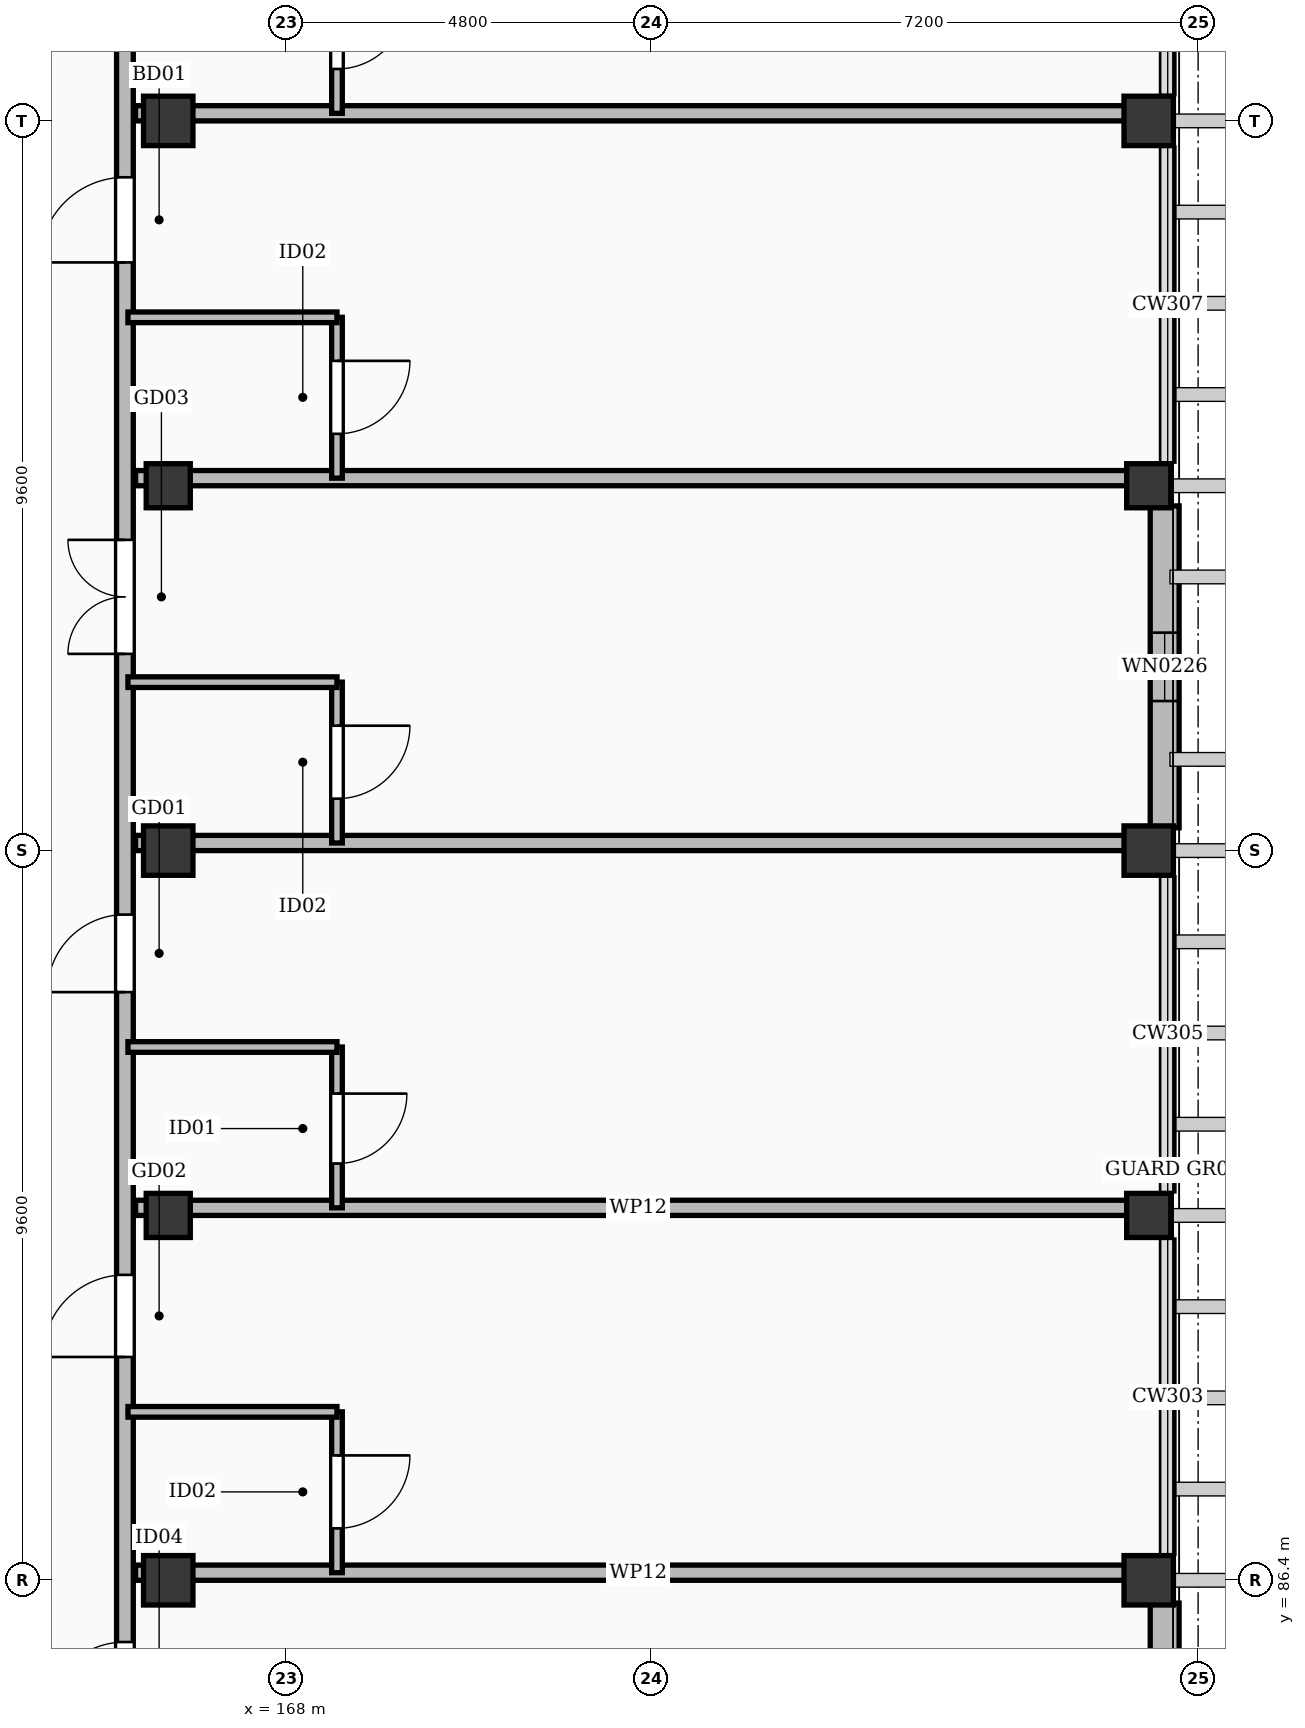
"""IFC4 building model, lengths in metres.
Left out: names, types, materials, properties, quantities, classifications, styles, units other than length and angle.
Written with IfcOpenShell. Run it as: python <this file> out.ifc"""

import sys

from ifc_helpers import new_model, si_unit, direction, frame, frame_2d, origin, origin_2d, place, context, subcontext, project, spatial, rectangle, extrude, element, fill, save


model = new_model("IFC4")
c1 = context("Model", 3, precision=1e-05, world=origin(), true_north=direction((0.0, 1.0)))
c2 = subcontext(c1, "Body", "Model", "MODEL_VIEW")
j1 = project(units=[si_unit("LENGTHUNIT", "METRE"), si_unit("PLANEANGLEUNIT", "RADIAN")], contexts=[c1])
p1 = place(None, origin())
s1 = spatial("IfcSite", under=j1, at=p1, CompositionType="ELEMENT")
p2 = place(p1, origin())
s2 = spatial("IfcBuilding", under=s1, at=p2, CompositionType="ELEMENT")
p3 = place(p2, frame((0.0, 0.0, 39.0)))
s3 = spatial("IfcBuildingStorey", under=s2, at=p3, CompositionType="ELEMENT", Elevation=39.0)
for number, where, z_axis, x_axis in (
    (1, (166.45, 86.4, 0.0), (0.0, 0.0, 1.0), (1.0, 0.0, 0.0)),
    (2, (166.45, 96.0, 0.0), (0.0, 0.0, 1.0), (1.0, 0.0, 0.0)),
    (3, (166.45, 105.6, 0.0), (0.0, 0.0, 1.0), (1.0, 0.0, 0.0)),
    (4, (179.35, 86.4, 0.0), (0.0, 0.0, 1.0), (1.0, 0.0, 0.0)),
    (5, (179.35, 96.0, 0.0), (0.0, 0.0, 1.0), (1.0, 0.0, 0.0)),
    (6, (179.35, 105.6, 0.0), (0.0, 0.0, 1.0), (1.0, 0.0, 0.0)),
):
    element("IfcColumn", number, at=place(p3, frame(where, z_axis=z_axis, x_axis=x_axis)), inside=s3, PredefinedType="COLUMN", context=c2, shape_type="SweptSolid", body=[
        extrude(rectangle(XDim=0.65, YDim=0.65, at=origin_2d()), origin(), (0.0, 0.0, 1.0), 3.6),
    ])
for number, where, z_axis, x_axis in (
    (7, (166.45, 91.2, 0.0), (0.0, 0.0, 1.0), (1.0, 0.0, 0.0)),
    (8, (166.45, 100.8, 0.0), (0.0, 0.0, 1.0), (1.0, 0.0, 0.0)),
    (9, (179.35, 91.2, 0.0), (0.0, 0.0, 1.0), (1.0, 0.0, 0.0)),
    (10, (179.35, 100.8, 0.0), (0.0, 0.0, 1.0), (1.0, 0.0, 0.0)),
):
    element("IfcColumn", number, at=place(p3, frame(where, z_axis=z_axis, x_axis=x_axis)), inside=s3, PredefinedType="COLUMN", context=c2, shape_type="SweptSolid", body=[
        extrude(rectangle(XDim=0.58, YDim=0.58, at=origin_2d()), origin(), (0.0, 0.0, 1.0), 3.6),
    ])
p4 = place(p3, frame((179.56, 86.1, 0.0), z_axis=(0.0, 0.0, 1.0), x_axis=(0.0, -1.0, 0.0)))
e11 = element("IfcWall", 11, at=p4, inside=s3, PredefinedType="SOLIDWALL", context=c2, shape_type="SweptSolid", body=[
    extrude(rectangle(XDim=4.235, YDim=0.38, at=frame_2d((2.118, 0.0))), origin(), (0.0, 0.0, 1.0), 2.602),
])
p5 = place(p4, frame((0.992, 0.0, 0.55)))
e12 = element("IfcOpeningElement", 12, at=p5, cuts=e11, PredefinedType="OPENING", context=c2, shape_type="SweptSolid", body=[
    extrude(rectangle(XDim=2.25, YDim=1.79, at=frame_2d((1.125, 0.895))), frame((0.0, 0.202, 0.0), z_axis=(0.0, -1.0, 0.0), x_axis=(1.0, 0.0, 0.0)), (0.0, 0.0, 1.0), 0.404),
])
p6 = place(p3, frame((179.56, 100.535, 0.0), z_axis=(0.0, 0.0, 1.0), x_axis=(0.0, -1.0, 0.0)))
e13 = element("IfcWall", 13, at=p6, inside=s3, PredefinedType="SOLIDWALL", context=c2, shape_type="SweptSolid", body=[
    extrude(rectangle(XDim=4.235, YDim=0.38, at=frame_2d((2.117, 0.0))), origin(), (0.0, 0.0, 1.0), 2.602),
])
p7 = place(p6, frame((1.667, 0.0, 0.55)))
e14 = element("IfcOpeningElement", 14, at=p7, cuts=e13, PredefinedType="OPENING", context=c2, shape_type="SweptSolid", body=[
    extrude(rectangle(XDim=0.9, YDim=1.68, at=frame_2d((0.45, 0.84))), frame((0.0, 0.202, 0.0), z_axis=(0.0, -1.0, 0.0), x_axis=(1.0, 0.0, 0.0)), (0.0, 0.0, 1.0), 0.404),
])
p8 = place(p3, frame((165.88, 57.95, 0.0), z_axis=(0.0, 0.0, 1.0), x_axis=(0.0, 1.0, 0.0)))
e15 = element("IfcWall", 15, at=p8, inside=s3, PredefinedType="PARTITIONING", context=c2, shape_type="SweptSolid", body=[
    extrude(rectangle(XDim=67.7, YDim=0.22, at=frame_2d((33.85, 0.0))), origin(), (0.0, 0.0, 1.0), 2.602),
])
p9 = place(p8, frame((5.15, 0.0, 0.0)))
e16 = element("IfcOpeningElement", 16, at=p9, cuts=e15, PredefinedType="OPENING", context=c2, shape_type="SweptSolid", body=[
    extrude(rectangle(XDim=0.98, YDim=2.15, at=frame_2d((0.49, 1.075))), frame((0.0, 0.122, 0.0), z_axis=(0.0, -1.0, 0.0), x_axis=(1.0, 0.0, 0.0)), (0.0, 0.0, 1.0), 0.244),
])
p10 = place(p8, frame((11.838, 0.0, 0.0)))
e17 = element("IfcOpeningElement", 17, at=p10, cuts=e15, PredefinedType="OPENING", context=c2, shape_type="SweptSolid", body=[
    extrude(rectangle(XDim=1.5, YDim=2.3, at=frame_2d((0.75, 1.15))), frame((0.0, 0.122, 0.0), z_axis=(0.0, -1.0, 0.0), x_axis=(1.0, 0.0, 0.0)), (0.0, 0.0, 1.0), 0.244),
])
p11 = place(p8, frame((16.988, 0.0, 0.0)))
e18 = element("IfcOpeningElement", 18, at=p11, cuts=e15, PredefinedType="OPENING", context=c2, shape_type="SweptSolid", body=[
    extrude(rectangle(XDim=1.12, YDim=2.15, at=frame_2d((0.56, 1.075))), frame((0.0, 0.122, 0.0), z_axis=(0.0, -1.0, 0.0), x_axis=(1.0, 0.0, 0.0)), (0.0, 0.0, 1.0), 0.244),
])
p12 = place(p8, frame((21.788, 0.0, 0.0)))
e19 = element("IfcOpeningElement", 19, at=p12, cuts=e15, PredefinedType="OPENING", context=c2, shape_type="SweptSolid", body=[
    extrude(rectangle(XDim=1.28, YDim=2.16, at=frame_2d((0.64, 1.08))), frame((0.0, 0.122, 0.0), z_axis=(0.0, -1.0, 0.0), x_axis=(1.0, 0.0, 0.0)), (0.0, 0.0, 1.0), 0.244),
])
p13 = place(p8, frame((26.588, 0.0, 0.0)))
e20 = element("IfcOpeningElement", 20, at=p13, cuts=e15, PredefinedType="OPENING", context=c2, shape_type="SweptSolid", body=[
    extrude(rectangle(XDim=1.05, YDim=2.18, at=frame_2d((0.525, 1.09))), frame((0.0, 0.122, 0.0), z_axis=(0.0, -1.0, 0.0), x_axis=(1.0, 0.0, 0.0)), (0.0, 0.0, 1.0), 0.244),
])
p14 = place(p8, frame((31.388, 0.0, 0.0)))
e21 = element("IfcOpeningElement", 21, at=p14, cuts=e15, PredefinedType="OPENING", context=c2, shape_type="SweptSolid", body=[
    extrude(rectangle(XDim=1.08, YDim=2.25, at=frame_2d((0.54, 1.125))), frame((0.0, 0.122, 0.0), z_axis=(0.0, -1.0, 0.0), x_axis=(1.0, 0.0, 0.0)), (0.0, 0.0, 1.0), 0.244),
])
p15 = place(p8, frame((36.188, 0.0, 0.0)))
e22 = element("IfcOpeningElement", 22, at=p15, cuts=e15, PredefinedType="OPENING", context=c2, shape_type="SweptSolid", body=[
    extrude(rectangle(XDim=1.02, YDim=2.2, at=frame_2d((0.51, 1.1))), frame((0.0, 0.122, 0.0), z_axis=(0.0, -1.0, 0.0), x_axis=(1.0, 0.0, 0.0)), (0.0, 0.0, 1.0), 0.244),
])
p16 = place(p8, frame((40.638, 0.0, 0.0)))
e23 = element("IfcOpeningElement", 23, at=p16, cuts=e15, PredefinedType="OPENING", context=c2, shape_type="SweptSolid", body=[
    extrude(rectangle(XDim=1.5, YDim=2.3, at=frame_2d((0.75, 1.15))), frame((0.0, 0.122, 0.0), z_axis=(0.0, -1.0, 0.0), x_axis=(1.0, 0.0, 0.0)), (0.0, 0.0, 1.0), 0.244),
])
p17 = place(p8, frame((45.788, 0.0, 0.0)))
e24 = element("IfcOpeningElement", 24, at=p17, cuts=e15, PredefinedType="OPENING", context=c2, shape_type="SweptSolid", body=[
    extrude(rectangle(XDim=1.12, YDim=2.15, at=frame_2d((0.56, 1.075))), frame((0.0, 0.122, 0.0), z_axis=(0.0, -1.0, 0.0), x_axis=(1.0, 0.0, 0.0)), (0.0, 0.0, 1.0), 0.244),
])
p18 = place(p8, frame((50.588, 0.0, 0.0)))
e25 = element("IfcOpeningElement", 25, at=p18, cuts=e15, PredefinedType="OPENING", context=c2, shape_type="SweptSolid", body=[
    extrude(rectangle(XDim=1.28, YDim=2.16, at=frame_2d((0.64, 1.08))), frame((0.0, 0.122, 0.0), z_axis=(0.0, -1.0, 0.0), x_axis=(1.0, 0.0, 0.0)), (0.0, 0.0, 1.0), 0.244),
])
p19 = place(p8, frame((55.388, 0.0, 0.0)))
e26 = element("IfcOpeningElement", 26, at=p19, cuts=e15, PredefinedType="OPENING", context=c2, shape_type="SweptSolid", body=[
    extrude(rectangle(XDim=1.05, YDim=2.18, at=frame_2d((0.525, 1.09))), frame((0.0, 0.122, 0.0), z_axis=(0.0, -1.0, 0.0), x_axis=(1.0, 0.0, 0.0)), (0.0, 0.0, 1.0), 0.244),
])
p20 = place(p8, frame((60.188, 0.0, 0.0)))
e27 = element("IfcOpeningElement", 27, at=p20, cuts=e15, PredefinedType="OPENING", context=c2, shape_type="SweptSolid", body=[
    extrude(rectangle(XDim=1.08, YDim=2.25, at=frame_2d((0.54, 1.125))), frame((0.0, 0.122, 0.0), z_axis=(0.0, -1.0, 0.0), x_axis=(1.0, 0.0, 0.0)), (0.0, 0.0, 1.0), 0.244),
])
p21 = place(p8, frame((64.988, 0.0, 0.0)))
e28 = element("IfcOpeningElement", 28, at=p21, cuts=e15, PredefinedType="OPENING", context=c2, shape_type="SweptSolid", body=[
    extrude(rectangle(XDim=1.02, YDim=2.2, at=frame_2d((0.51, 1.1))), frame((0.0, 0.122, 0.0), z_axis=(0.0, -1.0, 0.0), x_axis=(1.0, 0.0, 0.0)), (0.0, 0.0, 1.0), 0.244),
])
p22 = place(p3, frame((166.02, 86.5, 0.0), z_axis=(0.0, 0.0, 1.0), x_axis=(1.0, 0.0, 0.0)))
e29 = element("IfcWall", 29, at=p22, inside=s3, PredefinedType="PARTITIONING", context=c2, shape_type="SweptSolid", body=[
    extrude(rectangle(XDim=13.23, YDim=0.2, at=frame_2d((6.615, 0.0))), origin(), (0.0, 0.0, 1.0), 2.602),
])
p23 = place(p3, frame((168.67, 86.5, 0.0), z_axis=(0.0, 0.0, 1.0), x_axis=(0.0, 1.0, 0.0)))
e30 = element("IfcWall", 30, at=p23, inside=s3, PredefinedType="PARTITIONING", context=c2, shape_type="SweptSolid", body=[
    extrude(rectangle(XDim=2.116, YDim=0.14, at=frame_2d((1.058, 0.0))), origin(), (0.0, 0.0, 1.0), 2.772),
])
p24 = place(p23, frame((0.583, 0.0, 0.0)))
e31 = element("IfcOpeningElement", 31, at=p24, cuts=e30, PredefinedType="OPENING", context=c2, shape_type="SweptSolid", body=[
    extrude(rectangle(XDim=0.96, YDim=2.12, at=frame_2d((0.48, 1.06))), frame((0.0, 0.082, 0.0), z_axis=(0.0, -1.0, 0.0), x_axis=(1.0, 0.0, 0.0)), (0.0, 0.0, 1.0), 0.164),
])
p25 = place(p3, frame((165.92, 88.616, 0.0), z_axis=(0.0, 0.0, 1.0), x_axis=(1.0, 0.0, 0.0)))
e32 = element("IfcWall", 32, at=p25, inside=s3, PredefinedType="PARTITIONING", context=c2, shape_type="SweptSolid", body=[
    extrude(rectangle(XDim=2.75, YDim=0.14, at=frame_2d((1.375, 0.0))), origin(), (0.0, 0.0, 1.0), 2.772),
])
p26 = place(p3, frame((166.02, 91.3, 0.0), z_axis=(0.0, 0.0, 1.0), x_axis=(1.0, 0.0, 0.0)))
e33 = element("IfcWall", 33, at=p26, inside=s3, PredefinedType="PARTITIONING", context=c2, shape_type="SweptSolid", body=[
    extrude(rectangle(XDim=13.23, YDim=0.2, at=frame_2d((6.615, 0.0))), origin(), (0.0, 0.0, 1.0), 2.602),
])
p27 = place(p3, frame((168.67, 91.3, 0.0), z_axis=(0.0, 0.0, 1.0), x_axis=(0.0, 1.0, 0.0)))
e34 = element("IfcWall", 34, at=p27, inside=s3, PredefinedType="PARTITIONING", context=c2, shape_type="SweptSolid", body=[
    extrude(rectangle(XDim=2.116, YDim=0.14, at=frame_2d((1.058, 0.0))), origin(), (0.0, 0.0, 1.0), 2.772),
])
p28 = place(p27, frame((0.583, 0.0, 0.0)))
e35 = element("IfcOpeningElement", 35, at=p28, cuts=e34, PredefinedType="OPENING", context=c2, shape_type="SweptSolid", body=[
    extrude(rectangle(XDim=0.92, YDim=2.1, at=frame_2d((0.46, 1.05))), frame((0.0, 0.082, 0.0), z_axis=(0.0, -1.0, 0.0), x_axis=(1.0, 0.0, 0.0)), (0.0, 0.0, 1.0), 0.164),
])
p29 = place(p3, frame((165.92, 93.416, 0.0), z_axis=(0.0, 0.0, 1.0), x_axis=(1.0, 0.0, 0.0)))
e36 = element("IfcWall", 36, at=p29, inside=s3, PredefinedType="PARTITIONING", context=c2, shape_type="SweptSolid", body=[
    extrude(rectangle(XDim=2.75, YDim=0.14, at=frame_2d((1.375, 0.0))), origin(), (0.0, 0.0, 1.0), 2.772),
])
p30 = place(p3, frame((166.02, 96.1, 0.0), z_axis=(0.0, 0.0, 1.0), x_axis=(1.0, 0.0, 0.0)))
e37 = element("IfcWall", 37, at=p30, inside=s3, PredefinedType="PARTITIONING", context=c2, shape_type="SweptSolid", body=[
    extrude(rectangle(XDim=13.23, YDim=0.2, at=frame_2d((6.615, 0.0))), origin(), (0.0, 0.0, 1.0), 2.602),
])
p31 = place(p3, frame((168.67, 96.1, 0.0), z_axis=(0.0, 0.0, 1.0), x_axis=(0.0, 1.0, 0.0)))
e38 = element("IfcWall", 38, at=p31, inside=s3, PredefinedType="PARTITIONING", context=c2, shape_type="SweptSolid", body=[
    extrude(rectangle(XDim=2.116, YDim=0.14, at=frame_2d((1.058, 0.0))), origin(), (0.0, 0.0, 1.0), 2.772),
])
p32 = place(p31, frame((0.583, 0.0, 0.0)))
e39 = element("IfcOpeningElement", 39, at=p32, cuts=e38, PredefinedType="OPENING", context=c2, shape_type="SweptSolid", body=[
    extrude(rectangle(XDim=0.96, YDim=2.12, at=frame_2d((0.48, 1.06))), frame((0.0, 0.082, 0.0), z_axis=(0.0, -1.0, 0.0), x_axis=(1.0, 0.0, 0.0)), (0.0, 0.0, 1.0), 0.164),
])
p33 = place(p3, frame((165.92, 98.216, 0.0), z_axis=(0.0, 0.0, 1.0), x_axis=(1.0, 0.0, 0.0)))
e40 = element("IfcWall", 40, at=p33, inside=s3, PredefinedType="PARTITIONING", context=c2, shape_type="SweptSolid", body=[
    extrude(rectangle(XDim=2.75, YDim=0.14, at=frame_2d((1.375, 0.0))), origin(), (0.0, 0.0, 1.0), 2.772),
])
p34 = place(p3, frame((166.02, 100.9, 0.0), z_axis=(0.0, 0.0, 1.0), x_axis=(1.0, 0.0, 0.0)))
e41 = element("IfcWall", 41, at=p34, inside=s3, PredefinedType="PARTITIONING", context=c2, shape_type="SweptSolid", body=[
    extrude(rectangle(XDim=13.23, YDim=0.2, at=frame_2d((6.615, 0.0))), origin(), (0.0, 0.0, 1.0), 2.602),
])
p35 = place(p3, frame((168.67, 100.9, 0.0), z_axis=(0.0, 0.0, 1.0), x_axis=(0.0, 1.0, 0.0)))
e42 = element("IfcWall", 42, at=p35, inside=s3, PredefinedType="PARTITIONING", context=c2, shape_type="SweptSolid", body=[
    extrude(rectangle(XDim=2.116, YDim=0.14, at=frame_2d((1.058, 0.0))), origin(), (0.0, 0.0, 1.0), 2.772),
])
p36 = place(p35, frame((0.583, 0.0, 0.0)))
e43 = element("IfcOpeningElement", 43, at=p36, cuts=e42, PredefinedType="OPENING", context=c2, shape_type="SweptSolid", body=[
    extrude(rectangle(XDim=0.96, YDim=2.12, at=frame_2d((0.48, 1.06))), frame((0.0, 0.082, 0.0), z_axis=(0.0, -1.0, 0.0), x_axis=(1.0, 0.0, 0.0)), (0.0, 0.0, 1.0), 0.164),
])
p37 = place(p3, frame((165.92, 103.016, 0.0), z_axis=(0.0, 0.0, 1.0), x_axis=(1.0, 0.0, 0.0)))
e44 = element("IfcWall", 44, at=p37, inside=s3, PredefinedType="PARTITIONING", context=c2, shape_type="SweptSolid", body=[
    extrude(rectangle(XDim=2.75, YDim=0.14, at=frame_2d((1.375, 0.0))), origin(), (0.0, 0.0, 1.0), 2.772),
])
p38 = place(p3, frame((166.02, 105.7, 0.0), z_axis=(0.0, 0.0, 1.0), x_axis=(1.0, 0.0, 0.0)))
e45 = element("IfcWall", 45, at=p38, inside=s3, PredefinedType="PARTITIONING", context=c2, shape_type="SweptSolid", body=[
    extrude(rectangle(XDim=13.23, YDim=0.2, at=frame_2d((6.615, 0.0))), origin(), (0.0, 0.0, 1.0), 2.602),
])
p39 = place(p3, frame((168.67, 105.7, 0.0), z_axis=(0.0, 0.0, 1.0), x_axis=(0.0, 1.0, 0.0)))
e46 = element("IfcWall", 46, at=p39, inside=s3, PredefinedType="PARTITIONING", context=c2, shape_type="SweptSolid", body=[
    extrude(rectangle(XDim=2.116, YDim=0.14, at=frame_2d((1.058, 0.0))), origin(), (0.0, 0.0, 1.0), 2.772),
])
p40 = place(p39, frame((0.583, 0.0, 0.0)))
e47 = element("IfcOpeningElement", 47, at=p40, cuts=e46, PredefinedType="OPENING", context=c2, shape_type="SweptSolid", body=[
    extrude(rectangle(XDim=0.92, YDim=2.1, at=frame_2d((0.46, 1.05))), frame((0.0, 0.082, 0.0), z_axis=(0.0, -1.0, 0.0), x_axis=(1.0, 0.0, 0.0)), (0.0, 0.0, 1.0), 0.164),
])
p41 = place(p7, origin())
e48 = element("IfcWindow", 48, at=p41, inside=s3, PartitioningType="SINGLE_PANEL", PredefinedType="WINDOW", context=c2, shape_type="SweptSolid", body=[
    extrude(rectangle(XDim=0.9, YDim=1.68, at=frame_2d((0.45, 0.84))), frame((0.0, 0.03, 0.0), z_axis=(0.0, -1.0, 0.0), x_axis=(1.0, 0.0, 0.0)), (0.0, 0.0, 1.0), 0.06),
])
fill(e14, e48)
p42 = place(p13, origin())
e49 = element("IfcDoor", 49, at=p42, inside=s3, OperationType="SINGLE_SWING_LEFT", PredefinedType="DOOR", context=c2, shape_type="SweptSolid", body=[
    extrude(rectangle(XDim=1.05, YDim=2.18, at=frame_2d((0.525, 1.09))), frame((0.0, 0.025, 0.0), z_axis=(0.0, -1.0, 0.0), x_axis=(1.0, 0.0, 0.0)), (0.0, 0.0, 1.0), 0.05),
])
fill(e20, e49)
p43 = place(p14, origin())
e50 = element("IfcDoor", 50, at=p43, inside=s3, OperationType="SINGLE_SWING_LEFT", PredefinedType="DOOR", context=c2, shape_type="SweptSolid", body=[
    extrude(rectangle(XDim=1.08, YDim=2.25, at=frame_2d((0.54, 1.125))), frame((0.0, 0.025, 0.0), z_axis=(0.0, -1.0, 0.0), x_axis=(1.0, 0.0, 0.0)), (0.0, 0.0, 1.0), 0.05),
])
fill(e21, e50)
p44 = place(p24, frame((0.96, 0.0, 0.0), z_axis=(0.0, 0.0, 1.0), x_axis=(-1.0, 0.0, 0.0)))
e51 = element("IfcDoor", 51, at=p44, inside=s3, OperationType="SINGLE_SWING_RIGHT", PredefinedType="DOOR", context=c2, shape_type="SweptSolid", body=[
    extrude(rectangle(XDim=0.96, YDim=2.12, at=frame_2d((0.48, 1.06))), frame((0.0, 0.025, 0.0), z_axis=(0.0, -1.0, 0.0), x_axis=(1.0, 0.0, 0.0)), (0.0, 0.0, 1.0), 0.05),
])
fill(e31, e51)
p45 = place(p15, origin())
e52 = element("IfcDoor", 52, at=p45, inside=s3, OperationType="SINGLE_SWING_LEFT", PredefinedType="DOOR", context=c2, shape_type="SweptSolid", body=[
    extrude(rectangle(XDim=1.02, YDim=2.2, at=frame_2d((0.51, 1.1))), frame((0.0, 0.025, 0.0), z_axis=(0.0, -1.0, 0.0), x_axis=(1.0, 0.0, 0.0)), (0.0, 0.0, 1.0), 0.05),
])
fill(e22, e52)
p46 = place(p28, frame((0.92, 0.0, 0.0), z_axis=(0.0, 0.0, 1.0), x_axis=(-1.0, 0.0, 0.0)))
e53 = element("IfcDoor", 53, at=p46, inside=s3, OperationType="SINGLE_SWING_RIGHT", PredefinedType="DOOR", context=c2, shape_type="SweptSolid", body=[
    extrude(rectangle(XDim=0.92, YDim=2.1, at=frame_2d((0.46, 1.05))), frame((0.0, 0.025, 0.0), z_axis=(0.0, -1.0, 0.0), x_axis=(1.0, 0.0, 0.0)), (0.0, 0.0, 1.0), 0.05),
])
fill(e35, e53)
p47 = place(p16, origin())
e54 = element("IfcDoor", 54, at=p47, inside=s3, OperationType="DOUBLE_DOOR_SINGLE_SWING", PredefinedType="DOOR", context=c2, shape_type="SweptSolid", body=[
    extrude(rectangle(XDim=1.5, YDim=2.3, at=frame_2d((0.75, 1.15))), frame((0.0, 0.025, 0.0), z_axis=(0.0, -1.0, 0.0), x_axis=(1.0, 0.0, 0.0)), (0.0, 0.0, 1.0), 0.05),
])
fill(e23, e54)
p48 = place(p32, frame((0.96, 0.0, 0.0), z_axis=(0.0, 0.0, 1.0), x_axis=(-1.0, 0.0, 0.0)))
e55 = element("IfcDoor", 55, at=p48, inside=s3, OperationType="SINGLE_SWING_RIGHT", PredefinedType="DOOR", context=c2, shape_type="SweptSolid", body=[
    extrude(rectangle(XDim=0.96, YDim=2.12, at=frame_2d((0.48, 1.06))), frame((0.0, 0.025, 0.0), z_axis=(0.0, -1.0, 0.0), x_axis=(1.0, 0.0, 0.0)), (0.0, 0.0, 1.0), 0.05),
])
fill(e39, e55)
p49 = place(p17, origin())
e56 = element("IfcDoor", 56, at=p49, inside=s3, OperationType="SINGLE_SWING_LEFT", PredefinedType="DOOR", context=c2, shape_type="SweptSolid", body=[
    extrude(rectangle(XDim=1.12, YDim=2.15, at=frame_2d((0.56, 1.075))), frame((0.0, 0.025, 0.0), z_axis=(0.0, -1.0, 0.0), x_axis=(1.0, 0.0, 0.0)), (0.0, 0.0, 1.0), 0.05),
])
fill(e24, e56)
p50 = place(p36, frame((0.96, 0.0, 0.0), z_axis=(0.0, 0.0, 1.0), x_axis=(-1.0, 0.0, 0.0)))
e57 = element("IfcDoor", 57, at=p50, inside=s3, OperationType="SINGLE_SWING_RIGHT", PredefinedType="DOOR", context=c2, shape_type="SweptSolid", body=[
    extrude(rectangle(XDim=0.96, YDim=2.12, at=frame_2d((0.48, 1.06))), frame((0.0, 0.025, 0.0), z_axis=(0.0, -1.0, 0.0), x_axis=(1.0, 0.0, 0.0)), (0.0, 0.0, 1.0), 0.05),
])
fill(e43, e57)
p51 = place(p40, frame((0.92, 0.0, 0.0), z_axis=(0.0, 0.0, 1.0), x_axis=(-1.0, 0.0, 0.0)))
e58 = element("IfcDoor", 58, at=p51, inside=s3, OperationType="SINGLE_SWING_RIGHT", PredefinedType="DOOR", context=c2, shape_type="SweptSolid", body=[
    extrude(rectangle(XDim=0.92, YDim=2.1, at=frame_2d((0.46, 1.05))), frame((0.0, 0.025, 0.0), z_axis=(0.0, -1.0, 0.0), x_axis=(1.0, 0.0, 0.0)), (0.0, 0.0, 1.0), 0.05),
])
fill(e47, e58)
save(model, sys.argv[1])
